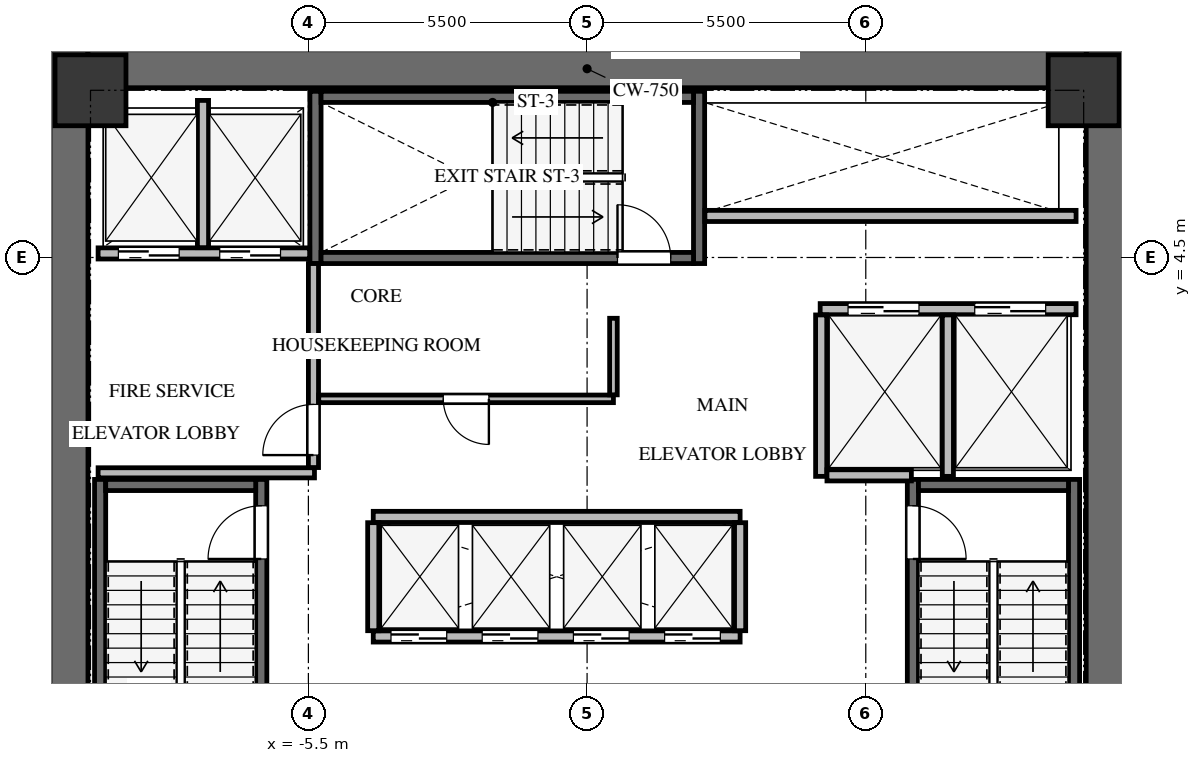
"""IFC4 building model, lengths in metres.
Left out: names, types, materials, properties, quantities, classifications, styles, units other than length and angle.
Written with IfcOpenShell. Run it as: python <this file> out.ifc"""

import sys

from ifc_helpers import new_model, si_unit, direction, frame, frame_2d, origin, origin_2d, place, context, subcontext, project, spatial, rectangle, extrude, source, transform, mapped, element, fill, save


model = new_model("IFC4")
c1 = context("Model", 3, precision=1e-05, world=origin(), true_north=direction((0.0, 1.0)))
c2 = subcontext(c1, "Body", "Model", "MODEL_VIEW")
j1 = project(units=[si_unit("LENGTHUNIT", "METRE"), si_unit("PLANEANGLEUNIT", "RADIAN")], contexts=[c1])
p1 = place(None, origin())
s1 = spatial("IfcSite", under=j1, at=p1, CompositionType="ELEMENT")
p2 = place(p1, origin())
s2 = spatial("IfcBuilding", under=s1, at=p2, CompositionType="ELEMENT")
p3 = place(p2, frame((0.0, 0.0, 100.8)))
s3 = spatial("IfcBuildingStorey", under=s2, at=p3, CompositionType="ELEMENT", Elevation=100.8)
for number, where, z_axis, x_axis in (
    (1, (-10.225, -8.6, 0.0), (0.0, 0.0, 1.0), (0.0, 1.0, 0.0)),
    (2, (10.225, -8.6, 0.0), (0.0, 0.0, 1.0), (0.0, 1.0, 0.0)),
):
    element("IfcWall", number, at=place(p3, frame(where, z_axis=z_axis, x_axis=x_axis)), inside=s3, PredefinedType="SHEAR", context=c2, shape_type="SweptSolid", body=[
        extrude(rectangle(XDim=17.2, YDim=0.75, at=frame_2d((8.6, 0.0))), origin(), (0.0, 0.0, 1.0), 3.3),
    ])
p4 = place(p3, frame((-9.85, 8.225, 0.0), z_axis=(0.0, 0.0, 1.0), x_axis=(1.0, 0.0, 0.0)))
e3 = element("IfcWall", 3, at=p4, inside=s3, PredefinedType="SHEAR", context=c2, shape_type="SweptSolid", body=[
    extrude(rectangle(XDim=19.7, YDim=0.75, at=frame_2d((9.85, 0.0))), origin(), (0.0, 0.0, 1.0), 3.3),
])
p5 = place(p3, frame((-6.43, -7.77, -0.24), z_axis=(0.0, 0.0, 1.0), x_axis=(0.0, 1.0, 0.0)))
e4 = element("IfcWall", 4, at=p5, inside=s3, PredefinedType="SHEAR", context=c2, shape_type="SweptSolid", body=[
    extrude(rectangle(XDim=7.89, YDim=0.22, at=frame_2d((3.945, 0.0))), origin(), (0.0, 0.0, 1.0), 3.3),
])
p6 = place(p5, frame((6.32, 0.0, 0.0)))
e5 = element("IfcOpeningElement", 5, at=p6, cuts=e4, PredefinedType="OPENING", context=c2, shape_type="SweptSolid", body=[
    extrude(rectangle(XDim=1.05, YDim=2.15, at=frame_2d((0.525, 1.075))), frame((0.0, 0.12, 0.0), z_axis=(0.0, -1.0, 0.0), x_axis=(1.0, 0.0, 0.0)), (0.0, 0.0, 1.0), 0.24),
])
p7 = place(p3, frame((-9.61, 0.12, -0.24), z_axis=(0.0, 0.0, 1.0), x_axis=(0.0, -1.0, 0.0)))
e6 = element("IfcWall", 6, at=p7, inside=s3, PredefinedType="SHEAR", context=c2, shape_type="SweptSolid", body=[
    extrude(rectangle(XDim=7.89, YDim=0.22, at=frame_2d((3.945, 0.0))), origin(), (0.0, 0.0, 1.0), 3.3),
])
p8 = place(p3, frame((-6.54, 0.01, -0.24), z_axis=(0.0, 0.0, 1.0), x_axis=(-1.0, 0.0, 0.0)))
e7 = element("IfcWall", 7, at=p8, inside=s3, PredefinedType="SHEAR", context=c2, shape_type="SweptSolid", body=[
    extrude(rectangle(XDim=2.96, YDim=0.22, at=frame_2d((1.48, 0.0))), origin(), (0.0, 0.0, 1.0), 3.3),
])
p9 = place(p3, frame((9.61, -7.77, -0.24), z_axis=(0.0, 0.0, 1.0), x_axis=(0.0, 1.0, 0.0)))
e8 = element("IfcWall", 8, at=p9, inside=s3, PredefinedType="SHEAR", context=c2, shape_type="SweptSolid", body=[
    extrude(rectangle(XDim=7.89, YDim=0.22, at=frame_2d((3.945, 0.0))), origin(), (0.0, 0.0, 1.0), 3.3),
])
p10 = place(p3, frame((6.43, 0.12, -0.24), z_axis=(0.0, 0.0, 1.0), x_axis=(0.0, -1.0, 0.0)))
e9 = element("IfcWall", 9, at=p10, inside=s3, PredefinedType="SHEAR", context=c2, shape_type="SweptSolid", body=[
    extrude(rectangle(XDim=7.89, YDim=0.22, at=frame_2d((3.945, 0.0))), origin(), (0.0, 0.0, 1.0), 3.3),
])
p11 = place(p10, frame((0.52, 0.0, 0.0)))
e10 = element("IfcOpeningElement", 10, at=p11, cuts=e9, PredefinedType="OPENING", context=c2, shape_type="SweptSolid", body=[
    extrude(rectangle(XDim=1.05, YDim=2.15, at=frame_2d((0.525, 1.075))), frame((0.0, 0.12, 0.0), z_axis=(0.0, -1.0, 0.0), x_axis=(1.0, 0.0, 0.0)), (0.0, 0.0, 1.0), 0.24),
])
p12 = place(p3, frame((9.5, 0.01, -0.24), z_axis=(0.0, 0.0, 1.0), x_axis=(-1.0, 0.0, 0.0)))
e11 = element("IfcWall", 11, at=p12, inside=s3, PredefinedType="SHEAR", context=c2, shape_type="SweptSolid", body=[
    extrude(rectangle(XDim=2.96, YDim=0.22, at=frame_2d((1.48, 0.0))), origin(), (0.0, 0.0, 1.0), 3.3),
])
for number, where, z_axis, x_axis in (
    (12, (2.21, 4.38, -0.24), (0.0, 0.0, 1.0), (0.0, 1.0, 0.0)),
    (13, (-5.36, 7.78, -0.24), (0.0, 0.0, 1.0), (0.0, -1.0, 0.0)),
):
    element("IfcWall", number, at=place(p3, frame(where, z_axis=z_axis, x_axis=x_axis)), inside=s3, PredefinedType="SHEAR", context=c2, shape_type="SweptSolid", body=[
        extrude(rectangle(XDim=3.4, YDim=0.22, at=frame_2d((1.7, 0.0))), origin(), (0.0, 0.0, 1.0), 3.3),
    ])
p13 = place(p3, frame((-5.25, 4.49, -0.24), z_axis=(0.0, 0.0, 1.0), x_axis=(1.0, 0.0, 0.0)))
e14 = element("IfcWall", 14, at=p13, inside=s3, PredefinedType="SHEAR", context=c2, shape_type="SweptSolid", body=[
    extrude(rectangle(XDim=7.35, YDim=0.22, at=frame_2d((3.675, 0.0))), origin(), (0.0, 0.0, 1.0), 3.3),
])
p14 = place(p13, frame((5.85, 0.0, 0.0)))
e15 = element("IfcOpeningElement", 15, at=p14, cuts=e14, PredefinedType="OPENING", context=c2, shape_type="SweptSolid", body=[
    extrude(rectangle(XDim=1.05, YDim=2.15, at=frame_2d((0.525, 1.075))), frame((0.0, 0.12, 0.0), z_axis=(0.0, -1.0, 0.0), x_axis=(1.0, 0.0, 0.0)), (0.0, 0.0, 1.0), 0.24),
])
p15 = place(p3, frame((2.1, 7.67, -0.24), z_axis=(0.0, 0.0, 1.0), x_axis=(-1.0, 0.0, 0.0)))
e16 = element("IfcWall", 16, at=p15, inside=s3, PredefinedType="SHEAR", context=c2, shape_type="SweptSolid", body=[
    extrude(rectangle(XDim=7.35, YDim=0.22, at=frame_2d((3.675, 0.0))), origin(), (0.0, 0.0, 1.0), 3.3),
])
m1 = source(origin(), c2, "Body", "SweptSolid", [
    extrude(rectangle(XDim=1.4, YDim=1.4, at=origin_2d()), origin(), (0.0, 0.0, 1.0), 3.3),
])
for number, where, z_axis, x_axis in (
    (17, (9.8, 7.8, -0.24), (0.0, 0.0, 1.0), (1.0, 0.0, 0.0)),
    (18, (-9.8, 7.8, -0.24), (0.0, 0.0, 1.0), (1.0, 0.0, 0.0)),
):
    element("IfcColumn", number, at=place(p3, frame(where, z_axis=z_axis, x_axis=x_axis)), inside=s3, PredefinedType="COLUMN", context=c2, shape_type="MappedRepresentation", body=[
        mapped(m1, transform((0.0, 0.0, 0.0), x_axis=(1.0, 0.0, 0.0), y_axis=(0.0, 1.0, 0.0), z_axis=(0.0, 0.0, 1.0), scale=1.0)),
    ])
p16 = place(p3, frame((-9.65, 4.58, 0.0), z_axis=(0.0, 0.0, 1.0), x_axis=(1.0, 0.0, 0.0)))
e19 = element("IfcWall", 19, at=p16, inside=s3, PredefinedType="SOLIDWALL", context=c2, shape_type="SweptSolid", body=[
    extrude(rectangle(XDim=4.175, YDim=0.22, at=frame_2d((2.087, 0.0))), origin(), (0.0, 0.0, 1.0), 3.045),
])
p17 = place(p16, frame((0.4, 0.0, 0.0)))
e20 = element("IfcOpeningElement", 20, at=p17, cuts=e19, PredefinedType="OPENING", context=c2, shape_type="SweptSolid", body=[
    extrude(rectangle(XDim=1.2, YDim=2.15, at=frame_2d((0.6, 1.075))), frame((0.0, 0.12, 0.0), z_axis=(0.0, -1.0, 0.0), x_axis=(1.0, 0.0, 0.0)), (0.0, 0.0, 1.0), 0.24),
])
p18 = place(p16, frame((2.4, 0.0, 0.0)))
e21 = element("IfcOpeningElement", 21, at=p18, cuts=e19, PredefinedType="OPENING", context=c2, shape_type="SweptSolid", body=[
    extrude(rectangle(XDim=1.2, YDim=2.15, at=frame_2d((0.6, 1.075))), frame((0.0, 0.12, 0.0), z_axis=(0.0, -1.0, 0.0), x_axis=(1.0, 0.0, 0.0)), (0.0, 0.0, 1.0), 0.24),
])
p19 = place(p3, frame((-7.58, 4.694, 0.0), z_axis=(0.0, 0.0, 1.0), x_axis=(0.0, 1.0, 0.0)))
e22 = element("IfcWall", 22, at=p19, inside=s3, PredefinedType="SOLIDWALL", context=c2, shape_type="SweptSolid", body=[
    extrude(rectangle(XDim=2.906, YDim=0.22, at=frame_2d((1.453, 0.0))), origin(), (0.0, 0.0, 1.0), 3.045),
])
p20 = place(p3, frame((-9.65, 0.25, 0.0), z_axis=(0.0, 0.0, 1.0), x_axis=(1.0, 0.0, 0.0)))
e23 = element("IfcWall", 23, at=p20, inside=s3, PredefinedType="SOLIDWALL", context=c2, shape_type="SweptSolid", body=[
    extrude(rectangle(XDim=4.27, YDim=0.2, at=frame_2d((2.135, 0.0))), origin(), (0.0, 0.0, 1.0), 3.045),
])
p21 = place(p3, frame((-5.4, 0.354, 0.0), z_axis=(0.0, 0.0, 1.0), x_axis=(0.0, 1.0, 0.0)))
e24 = element("IfcWall", 24, at=p21, inside=s3, PredefinedType="SOLIDWALL", context=c2, shape_type="SweptSolid", body=[
    extrude(rectangle(XDim=4.026, YDim=0.2, at=frame_2d((2.013, 0.0))), origin(), (0.0, 0.0, 1.0), 3.045),
])
p22 = place(p21, frame((0.246, 0.0, 0.0)))
e25 = element("IfcOpeningElement", 25, at=p22, cuts=e24, PredefinedType="OPENING", context=c2, shape_type="SweptSolid", body=[
    extrude(rectangle(XDim=1.0, YDim=2.15, at=frame_2d((0.5, 1.075))), frame((0.0, 0.11, 0.0), z_axis=(0.0, -1.0, 0.0), x_axis=(1.0, 0.0, 0.0)), (0.0, 0.0, 1.0), 0.22),
])
p23 = place(p3, frame((4.6, 3.48, 0.0), z_axis=(0.0, 0.0, 1.0), x_axis=(1.0, 0.0, 0.0)))
e26 = element("IfcWall", 26, at=p23, inside=s3, PredefinedType="SOLIDWALL", context=c2, shape_type="SweptSolid", body=[
    extrude(rectangle(XDim=5.05, YDim=0.22, at=frame_2d((2.525, 0.0))), origin(), (0.0, 0.0, 1.0), 3.045),
])
p24 = place(p23, frame((0.55, 0.0, 0.0)))
e27 = element("IfcOpeningElement", 27, at=p24, cuts=e26, PredefinedType="OPENING", context=c2, shape_type="SweptSolid", body=[
    extrude(rectangle(XDim=1.4, YDim=2.15, at=frame_2d((0.7, 1.075))), frame((0.0, 0.12, 0.0), z_axis=(0.0, -1.0, 0.0), x_axis=(1.0, 0.0, 0.0)), (0.0, 0.0, 1.0), 0.24),
])
p25 = place(p23, frame((3.05, 0.0, 0.0)))
e28 = element("IfcOpeningElement", 28, at=p25, cuts=e26, PredefinedType="OPENING", context=c2, shape_type="SweptSolid", body=[
    extrude(rectangle(XDim=1.4, YDim=2.15, at=frame_2d((0.7, 1.075))), frame((0.0, 0.12, 0.0), z_axis=(0.0, -1.0, 0.0), x_axis=(1.0, 0.0, 0.0)), (0.0, 0.0, 1.0), 0.24),
])
for number, where, z_axis, x_axis in (
    (29, (4.62, 0.18, 0.0), (0.0, 0.0, 1.0), (0.0, 1.0, 0.0)),
    (30, (7.12, 0.18, 0.0), (0.0, 0.0, 1.0), (0.0, 1.0, 0.0)),
):
    element("IfcWall", number, at=place(p3, frame(where, z_axis=z_axis, x_axis=x_axis)), inside=s3, PredefinedType="SOLIDWALL", context=c2, shape_type="SweptSolid", body=[
        extrude(rectangle(XDim=3.186, YDim=0.22, at=frame_2d((1.593, 0.0))), origin(), (0.0, 0.0, 1.0), 3.045),
    ])
p26 = place(p3, frame((4.734, 0.2, 0.0), z_axis=(0.0, 0.0, 1.0), x_axis=(1.0, 0.0, 0.0)))
e31 = element("IfcWall", 31, at=p26, inside=s3, PredefinedType="SOLIDWALL", context=c2, shape_type="SweptSolid", body=[
    extrude(rectangle(XDim=1.666, YDim=0.22, at=frame_2d((0.833, 0.0))), origin(), (0.0, 0.0, 1.0), 3.045),
])
p27 = place(p3, frame((-4.22, -2.98, 0.0), z_axis=(0.0, 0.0, 1.0), x_axis=(1.0, 0.0, 0.0)))
e32 = element("IfcWall", 32, at=p27, inside=s3, PredefinedType="SOLIDWALL", context=c2, shape_type="SweptSolid", body=[
    extrude(rectangle(XDim=7.24, YDim=0.22, at=frame_2d((3.62, 0.0))), origin(), (0.0, 0.0, 1.0), 3.045),
])
p28 = place(p27, frame((0.35, 0.0, 0.0)))
e33 = element("IfcOpeningElement", 33, at=p28, cuts=e32, PredefinedType="OPENING", context=c2, shape_type="SweptSolid", body=[
    extrude(rectangle(XDim=1.1, YDim=2.15, at=frame_2d((0.55, 1.075))), frame((0.0, 0.12, 0.0), z_axis=(0.0, -1.0, 0.0), x_axis=(1.0, 0.0, 0.0)), (0.0, 0.0, 1.0), 0.24),
])
p29 = place(p27, frame((2.15, 0.0, 0.0)))
e34 = element("IfcOpeningElement", 34, at=p29, cuts=e32, PredefinedType="OPENING", context=c2, shape_type="SweptSolid", body=[
    extrude(rectangle(XDim=1.1, YDim=2.15, at=frame_2d((0.55, 1.075))), frame((0.0, 0.12, 0.0), z_axis=(0.0, -1.0, 0.0), x_axis=(1.0, 0.0, 0.0)), (0.0, 0.0, 1.0), 0.24),
])
p30 = place(p27, frame((3.95, 0.0, 0.0)))
e35 = element("IfcOpeningElement", 35, at=p30, cuts=e32, PredefinedType="OPENING", context=c2, shape_type="SweptSolid", body=[
    extrude(rectangle(XDim=1.1, YDim=2.15, at=frame_2d((0.55, 1.075))), frame((0.0, 0.12, 0.0), z_axis=(0.0, -1.0, 0.0), x_axis=(1.0, 0.0, 0.0)), (0.0, 0.0, 1.0), 0.24),
])
p31 = place(p27, frame((5.75, 0.0, 0.0)))
e36 = element("IfcOpeningElement", 36, at=p31, cuts=e32, PredefinedType="OPENING", context=c2, shape_type="SweptSolid", body=[
    extrude(rectangle(XDim=1.1, YDim=2.15, at=frame_2d((0.55, 1.075))), frame((0.0, 0.12, 0.0), z_axis=(0.0, -1.0, 0.0), x_axis=(1.0, 0.0, 0.0)), (0.0, 0.0, 1.0), 0.24),
])
p32 = place(p3, frame((-4.22, -0.62, 0.0), z_axis=(0.0, 0.0, 1.0), x_axis=(1.0, 0.0, 0.0)))
e37 = element("IfcWall", 37, at=p32, inside=s3, PredefinedType="SOLIDWALL", context=c2, shape_type="SweptSolid", body=[
    extrude(rectangle(XDim=7.24, YDim=0.22, at=frame_2d((3.62, 0.0))), origin(), (0.0, 0.0, 1.0), 3.045),
])
for number, where, z_axis, x_axis in (
    (38, (-4.22, -2.866, 0.0), (0.0, 0.0, 1.0), (0.0, 1.0, 0.0)),
    (39, (3.02, -2.866, 0.0), (0.0, 0.0, 1.0), (0.0, 1.0, 0.0)),
):
    element("IfcWall", number, at=place(p3, frame(where, z_axis=z_axis, x_axis=x_axis)), inside=s3, PredefinedType="SOLIDWALL", context=c2, shape_type="SweptSolid", body=[
        extrude(rectangle(XDim=2.132, YDim=0.22, at=frame_2d((1.066, 0.0))), origin(), (0.0, 0.0, 1.0), 3.045),
    ])
p33 = place(p3, frame((2.325, 5.32, 0.0), z_axis=(0.0, 0.0, 1.0), x_axis=(1.0, 0.0, 0.0)))
e40 = element("IfcWall", 40, at=p33, inside=s3, PredefinedType="SOLIDWALL", context=c2, shape_type="SweptSolid", body=[
    extrude(rectangle(XDim=7.325, YDim=0.22, at=frame_2d((3.663, 0.0))), origin(), (0.0, 0.0, 1.0), 3.045),
])
p34 = place(p3, frame((0.52, 1.71, 0.0), z_axis=(0.0, 0.0, 1.0), x_axis=(-1.0, 0.0, 0.0)))
e41 = element("IfcWall", 41, at=p34, inside=s3, PredefinedType="PARTITIONING", context=c2, shape_type="SweptSolid", body=[
    extrude(rectangle(XDim=5.816, YDim=0.15, at=frame_2d((2.908, 0.0))), origin(), (0.0, 0.0, 1.0), 3.045),
])
p35 = place(p34, frame((2.458, 0.0, 0.0)))
e42 = element("IfcOpeningElement", 42, at=p35, cuts=e41, PredefinedType="OPENING", context=c2, shape_type="SweptSolid", body=[
    extrude(rectangle(XDim=0.9, YDim=2.05, at=frame_2d((0.45, 1.025))), frame((0.0, 0.085, 0.0), z_axis=(0.0, -1.0, 0.0), x_axis=(1.0, 0.0, 0.0)), (0.0, 0.0, 1.0), 0.17),
])
p36 = place(p3, frame((0.52, 3.3, 0.0), z_axis=(0.0, 0.0, 1.0), x_axis=(0.0, -1.0, 0.0)))
e43 = element("IfcWall", 43, at=p36, inside=s3, PredefinedType="PARTITIONING", context=c2, shape_type="SweptSolid", body=[
    extrude(rectangle(XDim=1.511, YDim=0.15, at=frame_2d((0.755, 0.0))), origin(), (0.0, 0.0, 1.0), 3.045),
])
m2 = source(origin(), c2, "Body", "SweptSolid", [
    extrude(rectangle(XDim=1.05, YDim=2.15, at=frame_2d((0.525, 1.075))), frame((0.0, 0.025, 0.0), z_axis=(0.0, -1.0, 0.0), x_axis=(1.0, 0.0, 0.0)), (0.0, 0.0, 1.0), 0.05),
])
p37 = place(p6, origin())
e44 = element("IfcDoor", 44, at=p37, inside=s3, OperationType="SINGLE_SWING_LEFT", PredefinedType="DOOR", context=c2, shape_type="MappedRepresentation", body=[
    mapped(m2, transform((0.0, 0.0, 0.0), x_axis=(1.0, 0.0, 0.0), y_axis=(0.0, 1.0, 0.0), z_axis=(0.0, 0.0, 1.0), scale=1.0)),
])
fill(e5, e44)
m3 = source(origin(), c2, "Body", "SweptSolid", [
    extrude(rectangle(XDim=1.05, YDim=2.15, at=frame_2d((0.525, 1.075))), frame((0.0, 0.025, 0.0), z_axis=(0.0, -1.0, 0.0), x_axis=(1.0, 0.0, 0.0)), (0.0, 0.0, 1.0), 0.05),
])
p38 = place(p11, origin())
e45 = element("IfcDoor", 45, at=p38, inside=s3, OperationType="SINGLE_SWING_RIGHT", PredefinedType="DOOR", context=c2, shape_type="MappedRepresentation", body=[
    mapped(m3, transform((0.0, 0.0, 0.0), x_axis=(1.0, 0.0, 0.0), y_axis=(0.0, 1.0, 0.0), z_axis=(0.0, 0.0, 1.0), scale=1.0)),
])
fill(e10, e45)
p39 = place(p14, origin())
e46 = element("IfcDoor", 46, at=p39, inside=s3, OperationType="SINGLE_SWING_LEFT", PredefinedType="DOOR", context=c2, shape_type="MappedRepresentation", body=[
    mapped(m2, transform((0.0, 0.0, 0.0), x_axis=(1.0, 0.0, 0.0), y_axis=(0.0, 1.0, 0.0), z_axis=(0.0, 0.0, 1.0), scale=1.0)),
])
fill(e15, e46)
m4 = source(origin(), c2, "Body", "SweptSolid", [
    extrude(rectangle(XDim=1.2, YDim=2.15, at=frame_2d((0.6, 1.075))), frame((0.0, 0.025, 0.0), z_axis=(0.0, -1.0, 0.0), x_axis=(1.0, 0.0, 0.0)), (0.0, 0.0, 1.0), 0.05),
])
p40 = place(p17, origin())
e47 = element("IfcDoor", 47, at=p40, inside=s3, OperationType="DOUBLE_DOOR_SLIDING", PredefinedType="DOOR", context=c2, shape_type="MappedRepresentation", body=[
    mapped(m4, transform((0.0, 0.0, 0.0), x_axis=(1.0, 0.0, 0.0), y_axis=(0.0, 1.0, 0.0), z_axis=(0.0, 0.0, 1.0), scale=1.0)),
])
fill(e20, e47)
p41 = place(p18, origin())
e48 = element("IfcDoor", 48, at=p41, inside=s3, OperationType="DOUBLE_DOOR_SLIDING", PredefinedType="DOOR", context=c2, shape_type="MappedRepresentation", body=[
    mapped(m4, transform((0.0, 0.0, 0.0), x_axis=(1.0, 0.0, 0.0), y_axis=(0.0, 1.0, 0.0), z_axis=(0.0, 0.0, 1.0), scale=1.0)),
])
fill(e21, e48)
m5 = source(origin(), c2, "Body", "SweptSolid", [
    extrude(rectangle(XDim=1.0, YDim=2.15, at=frame_2d((0.5, 1.075))), frame((0.0, 0.025, 0.0), z_axis=(0.0, -1.0, 0.0), x_axis=(1.0, 0.0, 0.0)), (0.0, 0.0, 1.0), 0.05),
])
p42 = place(p22, origin())
e49 = element("IfcDoor", 49, at=p42, inside=s3, OperationType="SINGLE_SWING_LEFT", PredefinedType="DOOR", context=c2, shape_type="MappedRepresentation", body=[
    mapped(m5, transform((0.0, 0.0, 0.0), x_axis=(1.0, 0.0, 0.0), y_axis=(0.0, 1.0, 0.0), z_axis=(0.0, 0.0, 1.0), scale=1.0)),
])
fill(e25, e49)
m6 = source(origin(), c2, "Body", "SweptSolid", [
    extrude(rectangle(XDim=1.4, YDim=2.15, at=frame_2d((0.7, 1.075))), frame((0.0, 0.025, 0.0), z_axis=(0.0, -1.0, 0.0), x_axis=(1.0, 0.0, 0.0)), (0.0, 0.0, 1.0), 0.05),
])
p43 = place(p24, origin())
e50 = element("IfcDoor", 50, at=p43, inside=s3, OperationType="DOUBLE_DOOR_SLIDING", PredefinedType="DOOR", context=c2, shape_type="MappedRepresentation", body=[
    mapped(m6, transform((0.0, 0.0, 0.0), x_axis=(1.0, 0.0, 0.0), y_axis=(0.0, 1.0, 0.0), z_axis=(0.0, 0.0, 1.0), scale=1.0)),
])
fill(e27, e50)
p44 = place(p25, origin())
e51 = element("IfcDoor", 51, at=p44, inside=s3, OperationType="DOUBLE_DOOR_SLIDING", PredefinedType="DOOR", context=c2, shape_type="MappedRepresentation", body=[
    mapped(m6, transform((0.0, 0.0, 0.0), x_axis=(1.0, 0.0, 0.0), y_axis=(0.0, 1.0, 0.0), z_axis=(0.0, 0.0, 1.0), scale=1.0)),
])
fill(e28, e51)
m7 = source(origin(), c2, "Body", "SweptSolid", [
    extrude(rectangle(XDim=1.1, YDim=2.15, at=frame_2d((0.55, 1.075))), frame((0.0, 0.025, 0.0), z_axis=(0.0, -1.0, 0.0), x_axis=(1.0, 0.0, 0.0)), (0.0, 0.0, 1.0), 0.05),
])
p45 = place(p28, origin())
e52 = element("IfcDoor", 52, at=p45, inside=s3, OperationType="DOUBLE_DOOR_SLIDING", PredefinedType="DOOR", context=c2, shape_type="MappedRepresentation", body=[
    mapped(m7, transform((0.0, 0.0, 0.0), x_axis=(1.0, 0.0, 0.0), y_axis=(0.0, 1.0, 0.0), z_axis=(0.0, 0.0, 1.0), scale=1.0)),
])
fill(e33, e52)
p46 = place(p29, origin())
e53 = element("IfcDoor", 53, at=p46, inside=s3, OperationType="DOUBLE_DOOR_SLIDING", PredefinedType="DOOR", context=c2, shape_type="MappedRepresentation", body=[
    mapped(m7, transform((0.0, 0.0, 0.0), x_axis=(1.0, 0.0, 0.0), y_axis=(0.0, 1.0, 0.0), z_axis=(0.0, 0.0, 1.0), scale=1.0)),
])
fill(e34, e53)
p47 = place(p30, origin())
e54 = element("IfcDoor", 54, at=p47, inside=s3, OperationType="DOUBLE_DOOR_SLIDING", PredefinedType="DOOR", context=c2, shape_type="MappedRepresentation", body=[
    mapped(m7, transform((0.0, 0.0, 0.0), x_axis=(1.0, 0.0, 0.0), y_axis=(0.0, 1.0, 0.0), z_axis=(0.0, 0.0, 1.0), scale=1.0)),
])
fill(e35, e54)
p48 = place(p31, origin())
e55 = element("IfcDoor", 55, at=p48, inside=s3, OperationType="DOUBLE_DOOR_SLIDING", PredefinedType="DOOR", context=c2, shape_type="MappedRepresentation", body=[
    mapped(m7, transform((0.0, 0.0, 0.0), x_axis=(1.0, 0.0, 0.0), y_axis=(0.0, 1.0, 0.0), z_axis=(0.0, 0.0, 1.0), scale=1.0)),
])
fill(e36, e55)
m8 = source(origin(), c2, "Body", "SweptSolid", [
    extrude(rectangle(XDim=0.9, YDim=2.05, at=frame_2d((0.45, 1.025))), frame((0.0, 0.025, 0.0), z_axis=(0.0, -1.0, 0.0), x_axis=(1.0, 0.0, 0.0)), (0.0, 0.0, 1.0), 0.05),
])
p49 = place(p35, origin())
e56 = element("IfcDoor", 56, at=p49, inside=s3, OperationType="SINGLE_SWING_LEFT", PredefinedType="DOOR", context=c2, shape_type="MappedRepresentation", body=[
    mapped(m8, transform((0.0, 0.0, 0.0), x_axis=(1.0, 0.0, 0.0), y_axis=(0.0, 1.0, 0.0), z_axis=(0.0, 0.0, 1.0), scale=1.0)),
])
fill(e42, e56)
save(model, sys.argv[1])
